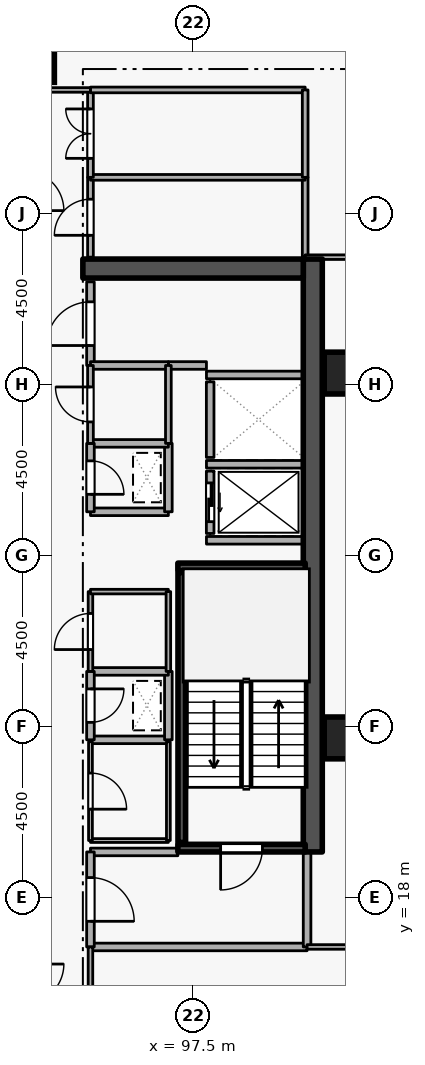
"""IFC4 building model, lengths in metres.
Left out: names, types, materials, properties, quantities, classifications, styles, units other than length and angle.
Written with IfcOpenShell. Run it as: python <this file> out.ifc"""

import sys

from ifc_helpers import new_model, si_unit, direction, frame, frame_2d, origin, origin_2d, place, context, subcontext, project, spatial, rectangle, extrude, element, fill, save


model = new_model("IFC4")
c1 = context("Model", 3, precision=1e-05, world=origin(), true_north=direction((0.0, 1.0)))
c2 = subcontext(c1, "Body", "Model", "MODEL_VIEW")
j1 = project(units=[si_unit("LENGTHUNIT", "METRE"), si_unit("PLANEANGLEUNIT", "RADIAN")], contexts=[c1])
p1 = place(None, origin())
s1 = spatial("IfcSite", under=j1, at=p1, CompositionType="ELEMENT")
p2 = place(p1, origin())
s2 = spatial("IfcBuilding", under=s1, at=p2, CompositionType="ELEMENT")
p3 = place(p2, frame((0.0, 0.0, 159.9)))
s3 = spatial("IfcBuildingStorey", under=s2, at=p3, CompositionType="ELEMENT", Elevation=159.9)
p4 = place(p3, frame((100.65, 19.2, 0.0), z_axis=(0.0, 0.0, 1.0), x_axis=(0.0, 1.0, 0.0)))
e1 = element("IfcWall", 1, at=p4, inside=s3, PredefinedType="SHEAR", context=c2, shape_type="SweptSolid", body=[
    extrude(rectangle(XDim=15.6, YDim=0.5, at=frame_2d((7.8, 0.0))), origin(), (0.0, 0.0, 1.0), 3.6),
])
p5 = place(p3, frame((94.6, 34.55, 0.0), z_axis=(0.0, 0.0, 1.0), x_axis=(1.0, 0.0, 0.0)))
e2 = element("IfcWall", 2, at=p5, inside=s3, PredefinedType="SHEAR", context=c2, shape_type="SweptSolid", body=[
    extrude(rectangle(XDim=5.8, YDim=0.5, at=frame_2d((2.9, 0.0))), origin(), (0.0, 0.0, 1.0), 3.6),
])
for number, where, z_axis, x_axis in (
    (3, (93.3, 40.0, 0.0), (0.0, 0.0, 1.0), (1.0, 0.0, 0.0)),
    (4, (101.5, 22.2, 0.0), (0.0, 0.0, 1.0), (1.0, 0.0, 0.0)),
    (5, (101.5, 31.8, 0.0), (0.0, 0.0, 1.0), (1.0, 0.0, 0.0)),
):
    element("IfcColumn", number, at=place(p3, frame(where, z_axis=z_axis, x_axis=x_axis)), inside=s3, PredefinedType="COLUMN", context=c2, shape_type="SweptSolid", body=[
        extrude(rectangle(XDim=1.1, YDim=1.1, at=origin_2d()), origin(), (0.0, 0.0, 1.0), 3.6),
    ])
p6 = place(p3, frame((97.95, 29.22, 0.0), z_axis=(0.0, 0.0, 1.0), x_axis=(0.0, -1.0, 0.0)))
e6 = element("IfcWall", 6, at=p6, inside=s3, PredefinedType="STANDARD", context=c2, shape_type="SweptSolid", body=[
    extrude(rectangle(XDim=1.64, YDim=0.2, at=frame_2d((0.82, 0.0))), origin(), (0.0, 0.0, 1.0), 3.34),
])
p7 = place(p6, frame((0.31, 0.0, 0.0)))
e7 = element("IfcOpeningElement", 7, at=p7, cuts=e6, PredefinedType="OPENING", context=c2, shape_type="SweptSolid", body=[
    extrude(rectangle(XDim=1.02, YDim=2.06, at=frame_2d((0.51, 1.03))), frame((0.0, 0.11, 0.0), z_axis=(0.0, -1.0, 0.0), x_axis=(1.0, 0.0, 0.0)), (0.0, 0.0, 1.0), 0.22),
])
p8 = place(p3, frame((97.95, 31.57, 0.0), z_axis=(0.0, 0.0, 1.0), x_axis=(0.0, -1.0, 0.0)))
e8 = element("IfcWall", 8, at=p8, inside=s3, PredefinedType="STANDARD", context=c2, shape_type="SweptSolid", body=[
    extrude(rectangle(XDim=1.99, YDim=0.2, at=frame_2d((0.995, 0.0))), origin(), (0.0, 0.0, 1.0), 3.34),
])
for number, where, z_axis, x_axis in (
    (9, (97.852, 29.4, 0.0), (0.0, 0.0, 1.0), (1.0, 0.0, 0.0)),
    (10, (97.852, 27.4, 0.0), (0.0, 0.0, 1.0), (1.0, 0.0, 0.0)),
    (11, (97.852, 31.75, 0.0), (0.0, 0.0, 1.0), (1.0, 0.0, 0.0)),
):
    element("IfcWall", number, at=place(p3, frame(where, z_axis=z_axis, x_axis=x_axis)), inside=s3, PredefinedType="STANDARD", context=c2, shape_type="SweptSolid", body=[
        extrude(rectangle(XDim=2.536, YDim=0.2, at=frame_2d((1.268, 0.0))), origin(), (0.0, 0.0, 1.0), 3.34),
    ])
p9 = place(p3, frame((100.45, 19.3, 0.0), z_axis=(0.0, 0.0, 1.0), x_axis=(-1.0, 0.0, 0.0)))
e12 = element("IfcWall", 12, at=p9, inside=s3, PredefinedType="SHEAR", context=c2, shape_type="SweptSolid", body=[
    extrude(rectangle(XDim=3.35, YDim=0.2, at=frame_2d((1.675, 0.0))), origin(), (0.0, 0.0, 1.0), 3.6),
])
p10 = place(p9, frame((1.125, 0.0, 0.0)))
e13 = element("IfcOpeningElement", 13, at=p10, cuts=e12, PredefinedType="OPENING", context=c2, shape_type="SweptSolid", body=[
    extrude(rectangle(XDim=1.1, YDim=2.1, at=frame_2d((0.55, 1.05))), frame((0.0, 0.11, 0.0), z_axis=(0.0, -1.0, 0.0), x_axis=(1.0, 0.0, 0.0)), (0.0, 0.0, 1.0), 0.22),
])
p11 = place(p3, frame((97.1, 26.7, 0.0), z_axis=(0.0, 0.0, 1.0), x_axis=(1.0, 0.0, 0.0)))
e14 = element("IfcWall", 14, at=p11, inside=s3, PredefinedType="SHEAR", context=c2, shape_type="SweptSolid", body=[
    extrude(rectangle(XDim=3.35, YDim=0.2, at=frame_2d((1.675, 0.0))), origin(), (0.0, 0.0, 1.0), 3.6),
])
p12 = place(p3, frame((97.203, 26.55, 0.0), z_axis=(0.0, 0.0, 1.0), x_axis=(0.0, -1.0, 0.0)))
e15 = element("IfcWall", 15, at=p12, inside=s3, PredefinedType="SHEAR", context=c2, shape_type="SweptSolid", body=[
    extrude(rectangle(XDim=7.1, YDim=0.2, at=frame_2d((3.55, 0.0))), origin(), (0.0, 0.0, 1.0), 3.6),
])
p13 = place(p3, frame((94.8, 16.7, 0.0), z_axis=(0.0, 0.0, 1.0), x_axis=(1.0, 0.0, 0.0)))
e16 = element("IfcWall", 16, at=p13, inside=s3, PredefinedType="STANDARD", context=c2, shape_type="SweptSolid", body=[
    extrude(rectangle(XDim=5.7, YDim=0.2, at=frame_2d((2.85, 0.0))), origin(), (0.0, 0.0, 1.0), 3.34),
])
p14 = place(p3, frame((100.5, 16.7, 0.0), z_axis=(0.0, 0.0, 1.0), x_axis=(0.0, 1.0, 0.0)))
e17 = element("IfcWall", 17, at=p14, inside=s3, PredefinedType="STANDARD", context=c2, shape_type="SweptSolid", body=[
    extrude(rectangle(XDim=2.5, YDim=0.2, at=frame_2d((1.25, 0.0))), origin(), (0.0, 0.0, 1.0), 3.34),
])
p15 = place(p3, frame((97.1, 19.2, 0.0), z_axis=(0.0, 0.0, 1.0), x_axis=(-1.0, 0.0, 0.0)))
e18 = element("IfcWall", 18, at=p15, inside=s3, PredefinedType="STANDARD", context=c2, shape_type="SweptSolid", body=[
    extrude(rectangle(XDim=2.3, YDim=0.2, at=frame_2d((1.15, 0.0))), origin(), (0.0, 0.0, 1.0), 2.545),
])
p16 = place(p3, frame((94.8, 19.2, 0.0), z_axis=(0.0, 0.0, 1.0), x_axis=(0.0, -1.0, 0.0)))
e19 = element("IfcWall", 19, at=p16, inside=s3, PredefinedType="STANDARD", context=c2, shape_type="SweptSolid", body=[
    extrude(rectangle(XDim=2.5, YDim=0.2, at=frame_2d((1.25, 0.0))), origin(), (0.0, 0.0, 1.0), 3.34),
])
p17 = place(p16, frame((0.675, 0.0, 0.0)))
e20 = element("IfcOpeningElement", 20, at=p17, cuts=e19, PredefinedType="OPENING", context=c2, shape_type="SweptSolid", body=[
    extrude(rectangle(XDim=1.15, YDim=2.1, at=frame_2d((0.575, 1.05))), frame((0.0, 0.11, 0.0), z_axis=(0.0, -1.0, 0.0), x_axis=(1.0, 0.0, 0.0)), (0.0, 0.0, 1.0), 0.22),
])
p18 = place(p3, frame((94.8, 28.15, 0.0), z_axis=(0.0, 0.0, 1.0), x_axis=(1.0, 0.0, 0.0)))
e21 = element("IfcWall", 21, at=p18, inside=s3, PredefinedType="STANDARD", context=c2, shape_type="SweptSolid", body=[
    extrude(rectangle(XDim=2.05, YDim=0.2, at=frame_2d((1.025, 0.0))), origin(), (0.0, 0.0, 1.0), 3.34),
])
p19 = place(p3, frame((96.85, 28.15, 0.0), z_axis=(0.0, 0.0, 1.0), x_axis=(0.0, 1.0, 0.0)))
e22 = element("IfcWall", 22, at=p19, inside=s3, PredefinedType="STANDARD", context=c2, shape_type="SweptSolid", body=[
    extrude(rectangle(XDim=1.8, YDim=0.2, at=frame_2d((0.9, 0.0))), origin(), (0.0, 0.0, 1.0), 3.34),
])
p20 = place(p3, frame((96.85, 29.95, 0.0), z_axis=(0.0, 0.0, 1.0), x_axis=(-1.0, 0.0, 0.0)))
e23 = element("IfcWall", 23, at=p20, inside=s3, PredefinedType="STANDARD", context=c2, shape_type="SweptSolid", body=[
    extrude(rectangle(XDim=2.05, YDim=0.2, at=frame_2d((1.025, 0.0))), origin(), (0.0, 0.0, 1.0), 3.34),
])
p21 = place(p3, frame((94.8, 29.95, 0.0), z_axis=(0.0, 0.0, 1.0), x_axis=(0.0, -1.0, 0.0)))
e24 = element("IfcWall", 24, at=p21, inside=s3, PredefinedType="STANDARD", context=c2, shape_type="SweptSolid", body=[
    extrude(rectangle(XDim=1.8, YDim=0.2, at=frame_2d((0.9, 0.0))), origin(), (0.0, 0.0, 1.0), 3.34),
])
p22 = place(p21, frame((0.46, 0.0, 0.0)))
e25 = element("IfcOpeningElement", 25, at=p22, cuts=e24, PredefinedType="OPENING", context=c2, shape_type="SweptSolid", body=[
    extrude(rectangle(XDim=0.88, YDim=2.04, at=frame_2d((0.44, 1.02))), frame((0.0, 0.11, 0.0), z_axis=(0.0, -1.0, 0.0), x_axis=(1.0, 0.0, 0.0)), (0.0, 0.0, 1.0), 0.22),
])
p23 = place(p3, frame((94.8, 22.15, 0.0), z_axis=(0.0, 0.0, 1.0), x_axis=(1.0, 0.0, 0.0)))
e26 = element("IfcWall", 26, at=p23, inside=s3, PredefinedType="STANDARD", context=c2, shape_type="SweptSolid", body=[
    extrude(rectangle(XDim=2.05, YDim=0.2, at=frame_2d((1.025, 0.0))), origin(), (0.0, 0.0, 1.0), 3.34),
])
p24 = place(p3, frame((96.85, 22.15, 0.0), z_axis=(0.0, 0.0, 1.0), x_axis=(0.0, 1.0, 0.0)))
e27 = element("IfcWall", 27, at=p24, inside=s3, PredefinedType="STANDARD", context=c2, shape_type="SweptSolid", body=[
    extrude(rectangle(XDim=1.8, YDim=0.2, at=frame_2d((0.9, 0.0))), origin(), (0.0, 0.0, 1.0), 3.34),
])
p25 = place(p3, frame((96.85, 23.95, 0.0), z_axis=(0.0, 0.0, 1.0), x_axis=(-1.0, 0.0, 0.0)))
e28 = element("IfcWall", 28, at=p25, inside=s3, PredefinedType="STANDARD", context=c2, shape_type="SweptSolid", body=[
    extrude(rectangle(XDim=2.05, YDim=0.2, at=frame_2d((1.025, 0.0))), origin(), (0.0, 0.0, 1.0), 3.34),
])
p26 = place(p3, frame((94.8, 23.95, 0.0), z_axis=(0.0, 0.0, 1.0), x_axis=(0.0, -1.0, 0.0)))
e29 = element("IfcWall", 29, at=p26, inside=s3, PredefinedType="STANDARD", context=c2, shape_type="SweptSolid", body=[
    extrude(rectangle(XDim=1.8, YDim=0.2, at=frame_2d((0.9, 0.0))), origin(), (0.0, 0.0, 1.0), 3.34),
])
p27 = place(p26, frame((0.46, 0.0, 0.0)))
e30 = element("IfcOpeningElement", 30, at=p27, cuts=e29, PredefinedType="OPENING", context=c2, shape_type="SweptSolid", body=[
    extrude(rectangle(XDim=0.88, YDim=2.04, at=frame_2d((0.44, 1.02))), frame((0.0, 0.11, 0.0), z_axis=(0.0, -1.0, 0.0), x_axis=(1.0, 0.0, 0.0)), (0.0, 0.0, 1.0), 0.22),
])
p28 = place(p3, frame((94.8, 32.0, 0.0), z_axis=(0.0, 0.0, 1.0), x_axis=(0.0, 1.0, 0.0)))
e31 = element("IfcWall", 31, at=p28, inside=s3, PredefinedType="STANDARD", context=c2, shape_type="SweptSolid", body=[
    extrude(rectangle(XDim=2.2, YDim=0.2, at=frame_2d((1.1, 0.0))), origin(), (0.0, 0.0, 1.0), 3.34),
])
p29 = place(p28, frame((0.525, 0.0, 0.0)))
e32 = element("IfcOpeningElement", 32, at=p29, cuts=e31, PredefinedType="OPENING", context=c2, shape_type="SweptSolid", body=[
    extrude(rectangle(XDim=1.15, YDim=2.1, at=frame_2d((0.575, 1.05))), frame((0.0, 0.11, 0.0), z_axis=(0.0, -1.0, 0.0), x_axis=(1.0, 0.0, 0.0)), (0.0, 0.0, 1.0), 0.22),
])
p30 = place(p3, frame((97.852, 32.0, 0.0), z_axis=(0.0, 0.0, 1.0), x_axis=(-1.0, 0.0, 0.0)))
e33 = element("IfcWall", 33, at=p30, inside=s3, PredefinedType="STANDARD", context=c2, shape_type="SweptSolid", body=[
    extrude(rectangle(XDim=1.002, YDim=0.2, at=frame_2d((0.501, 0.0))), origin(), (0.0, 0.0, 1.0), 3.34),
])
p31 = place(p3, frame((96.85, 32.0, 0.0), z_axis=(0.0, 0.0, 1.0), x_axis=(-1.0, 0.0, 0.0)))
e34 = element("IfcWall", 34, at=p31, inside=s3, PredefinedType="STANDARD", context=c2, shape_type="SweptSolid", body=[
    extrude(rectangle(XDim=2.05, YDim=0.2, at=frame_2d((1.025, 0.0))), origin(), (0.0, 0.0, 1.0), 3.34),
])
p32 = place(p3, frame((94.8, 19.5, 0.0), z_axis=(0.0, 0.0, 1.0), x_axis=(1.0, 0.0, 0.0)))
e35 = element("IfcWall", 35, at=p32, inside=s3, PredefinedType="PARTITIONING", context=c2, shape_type="SweptSolid", body=[
    extrude(rectangle(XDim=2.05, YDim=0.1, at=frame_2d((1.025, 0.0))), origin(), (0.0, 0.0, 1.0), 2.545),
])
p33 = place(p3, frame((96.85, 19.5, 0.0), z_axis=(0.0, 0.0, 1.0), x_axis=(0.0, 1.0, 0.0)))
e36 = element("IfcWall", 36, at=p33, inside=s3, PredefinedType="PARTITIONING", context=c2, shape_type="SweptSolid", body=[
    extrude(rectangle(XDim=2.6, YDim=0.1, at=frame_2d((1.3, 0.0))), origin(), (0.0, 0.0, 1.0), 3.34),
])
p34 = place(p3, frame((94.8, 22.1, 0.0), z_axis=(0.0, 0.0, 1.0), x_axis=(0.0, -1.0, 0.0)))
e37 = element("IfcWall", 37, at=p34, inside=s3, PredefinedType="PARTITIONING", context=c2, shape_type="SweptSolid", body=[
    extrude(rectangle(XDim=2.6, YDim=0.1, at=frame_2d((1.3, 0.0))), origin(), (0.0, 0.0, 1.0), 3.34),
])
p35 = place(p34, frame((0.825, 0.0, 0.0)))
e38 = element("IfcOpeningElement", 38, at=p35, cuts=e37, PredefinedType="OPENING", context=c2, shape_type="SweptSolid", body=[
    extrude(rectangle(XDim=0.95, YDim=2.1, at=frame_2d((0.475, 1.05))), frame((0.0, 0.06, 0.0), z_axis=(0.0, -1.0, 0.0), x_axis=(1.0, 0.0, 0.0)), (0.0, 0.0, 1.0), 0.12),
])
p36 = place(p3, frame((94.8, 23.95, 0.0), z_axis=(0.0, 0.0, 1.0), x_axis=(0.0, 1.0, 0.0)))
e39 = element("IfcWall", 39, at=p36, inside=s3, PredefinedType="PARTITIONING", context=c2, shape_type="SweptSolid", body=[
    extrude(rectangle(XDim=2.1, YDim=0.12, at=frame_2d((1.05, 0.0))), origin(), (0.0, 0.0, 1.0), 3.34),
])
p37 = place(p36, frame((0.575, 0.0, 0.0)))
e40 = element("IfcOpeningElement", 40, at=p37, cuts=e39, PredefinedType="OPENING", context=c2, shape_type="SweptSolid", body=[
    extrude(rectangle(XDim=0.95, YDim=2.1, at=frame_2d((0.475, 1.05))), frame((0.0, 0.07, 0.0), z_axis=(0.0, -1.0, 0.0), x_axis=(1.0, 0.0, 0.0)), (0.0, 0.0, 1.0), 0.14),
])
p38 = place(p3, frame((94.8, 26.05, 0.0), z_axis=(0.0, 0.0, 1.0), x_axis=(1.0, 0.0, 0.0)))
e41 = element("IfcWall", 41, at=p38, inside=s3, PredefinedType="PARTITIONING", context=c2, shape_type="SweptSolid", body=[
    extrude(rectangle(XDim=2.05, YDim=0.12, at=frame_2d((1.025, 0.0))), origin(), (0.0, 0.0, 1.0), 3.34),
])
p39 = place(p3, frame((96.85, 26.05, 0.0), z_axis=(0.0, 0.0, 1.0), x_axis=(0.0, -1.0, 0.0)))
e42 = element("IfcWall", 42, at=p39, inside=s3, PredefinedType="PARTITIONING", context=c2, shape_type="SweptSolid", body=[
    extrude(rectangle(XDim=2.1, YDim=0.12, at=frame_2d((1.05, 0.0))), origin(), (0.0, 0.0, 1.0), 3.34),
])
p40 = place(p3, frame((94.8, 29.95, 0.0), z_axis=(0.0, 0.0, 1.0), x_axis=(0.0, 1.0, 0.0)))
e43 = element("IfcWall", 43, at=p40, inside=s3, PredefinedType="PARTITIONING", context=c2, shape_type="SweptSolid", body=[
    extrude(rectangle(XDim=2.05, YDim=0.15, at=frame_2d((1.025, 0.0))), origin(), (0.0, 0.0, 1.0), 3.34),
])
p41 = place(p40, frame((0.565, 0.0, 0.0)))
e44 = element("IfcOpeningElement", 44, at=p41, cuts=e43, PredefinedType="OPENING", context=c2, shape_type="SweptSolid", body=[
    extrude(rectangle(XDim=0.92, YDim=2.08, at=frame_2d((0.46, 1.04))), frame((0.0, 0.085, 0.0), z_axis=(0.0, -1.0, 0.0), x_axis=(1.0, 0.0, 0.0)), (0.0, 0.0, 1.0), 0.17),
])
p42 = place(p3, frame((96.85, 32.0, 0.0), z_axis=(0.0, 0.0, 1.0), x_axis=(0.0, -1.0, 0.0)))
e45 = element("IfcWall", 45, at=p42, inside=s3, PredefinedType="PARTITIONING", context=c2, shape_type="SweptSolid", body=[
    extrude(rectangle(XDim=2.05, YDim=0.15, at=frame_2d((1.025, 0.0))), origin(), (0.0, 0.0, 1.0), 3.34),
])
p43 = place(p3, frame((100.45, 36.95, 0.0), z_axis=(0.0, 0.0, 1.0), x_axis=(0.0, -1.0, 0.0)))
e46 = element("IfcWall", 46, at=p43, inside=s3, PredefinedType="PARTITIONING", context=c2, shape_type="SweptSolid", body=[
    extrude(rectangle(XDim=2.1, YDim=0.15, at=frame_2d((1.05, 0.0))), origin(), (0.0, 0.0, 1.0), 3.34),
])
p44 = place(p3, frame((94.8, 34.85, 0.0), z_axis=(0.0, 0.0, 1.0), x_axis=(0.0, 1.0, 0.0)))
e47 = element("IfcWall", 47, at=p44, inside=s3, PredefinedType="PARTITIONING", context=c2, shape_type="SweptSolid", body=[
    extrude(rectangle(XDim=2.1, YDim=0.15, at=frame_2d((1.05, 0.0))), origin(), (0.0, 0.0, 1.0), 3.34),
])
p45 = place(p44, frame((0.575, 0.0, 0.0)))
e48 = element("IfcOpeningElement", 48, at=p45, cuts=e47, PredefinedType="OPENING", context=c2, shape_type="SweptSolid", body=[
    extrude(rectangle(XDim=0.95, YDim=2.1, at=frame_2d((0.475, 1.05))), frame((0.0, 0.085, 0.0), z_axis=(0.0, -1.0, 0.0), x_axis=(1.0, 0.0, 0.0)), (0.0, 0.0, 1.0), 0.17),
])
p46 = place(p3, frame((94.8, 36.95, 0.0), z_axis=(0.0, 0.0, 1.0), x_axis=(1.0, 0.0, 0.0)))
e49 = element("IfcWall", 49, at=p46, inside=s3, PredefinedType="PARTITIONING", context=c2, shape_type="SweptSolid", body=[
    extrude(rectangle(XDim=5.65, YDim=0.15, at=frame_2d((2.825, 0.0))), origin(), (0.0, 0.0, 1.0), 3.34),
])
p47 = place(p3, frame((94.8, 36.95, 0.0), z_axis=(0.0, 0.0, 1.0), x_axis=(0.0, 1.0, 0.0)))
e50 = element("IfcWall", 50, at=p47, inside=s3, PredefinedType="PARTITIONING", context=c2, shape_type="SweptSolid", body=[
    extrude(rectangle(XDim=2.3, YDim=0.15, at=frame_2d((1.15, 0.0))), origin(), (0.0, 0.0, 1.0), 3.34),
])
p48 = place(p47, frame((0.5, 0.0, 0.0)))
e51 = element("IfcOpeningElement", 51, at=p48, cuts=e50, PredefinedType="OPENING", context=c2, shape_type="SweptSolid", body=[
    extrude(rectangle(XDim=1.3, YDim=2.12, at=frame_2d((0.65, 1.06))), frame((0.0, 0.085, 0.0), z_axis=(0.0, -1.0, 0.0), x_axis=(1.0, 0.0, 0.0)), (0.0, 0.0, 1.0), 0.17),
])
p49 = place(p3, frame((94.8, 39.25, 0.0), z_axis=(0.0, 0.0, 1.0), x_axis=(1.0, 0.0, 0.0)))
e52 = element("IfcWall", 52, at=p49, inside=s3, PredefinedType="PARTITIONING", context=c2, shape_type="SweptSolid", body=[
    extrude(rectangle(XDim=5.65, YDim=0.15, at=frame_2d((2.825, 0.0))), origin(), (0.0, 0.0, 1.0), 3.34),
])
p50 = place(p3, frame((100.45, 39.25, 0.0), z_axis=(0.0, 0.0, 1.0), x_axis=(0.0, -1.0, 0.0)))
e53 = element("IfcWall", 53, at=p50, inside=s3, PredefinedType="PARTITIONING", context=c2, shape_type="SweptSolid", body=[
    extrude(rectangle(XDim=2.3, YDim=0.15, at=frame_2d((1.15, 0.0))), origin(), (0.0, 0.0, 1.0), 3.34),
])
p51 = place(p3, frame((94.8, 14.75, 0.0), z_axis=(0.0, 0.0, 1.0), x_axis=(0.0, 1.0, 0.0)))
e54 = element("IfcWall", 54, at=p51, inside=s3, PredefinedType="PARTITIONING", context=c2, shape_type="SweptSolid", body=[
    extrude(rectangle(XDim=1.95, YDim=0.12, at=frame_2d((0.975, 0.0))), origin(), (0.0, 0.0, 1.0), 3.34),
])
p52 = place(p3, frame((100.5, 16.7, 0.0), z_axis=(0.0, 0.0, 1.0), x_axis=(1.0, 0.0, 0.0)))
e55 = element("IfcWall", 55, at=p52, inside=s3, PredefinedType="PARTITIONING", context=c2, shape_type="SweptSolid", body=[
    extrude(rectangle(XDim=11.72, YDim=0.12, at=frame_2d((5.86, 0.0))), origin(), (0.0, 0.0, 1.0), 3.34),
])
p53 = place(p3, frame((94.8, 39.25, 0.0), z_axis=(0.0, 0.0, 1.0), x_axis=(-1.0, 0.0, 0.0)))
e56 = element("IfcWall", 56, at=p53, inside=s3, PredefinedType="PARTITIONING", context=c2, shape_type="SweptSolid", body=[
    extrude(rectangle(XDim=1.75, YDim=0.12, at=frame_2d((0.875, 0.0))), origin(), (0.0, 0.0, 1.0), 3.34),
])
p54 = place(p3, frame((112.22, 34.85, 0.0), z_axis=(0.0, 0.0, 1.0), x_axis=(-1.0, 0.0, 0.0)))
e57 = element("IfcWall", 57, at=p54, inside=s3, PredefinedType="PARTITIONING", context=c2, shape_type="SweptSolid", body=[
    extrude(rectangle(XDim=11.77, YDim=0.12, at=frame_2d((5.885, 0.0))), origin(), (0.0, 0.0, 1.0), 2.545),
])
p55 = place(p7, origin())
e58 = element("IfcDoor", 58, at=p55, inside=s3, OperationType="SLIDING_TO_LEFT", PredefinedType="DOOR", context=c2, shape_type="SweptSolid", body=[
    extrude(rectangle(XDim=1.02, YDim=2.06, at=frame_2d((0.51, 1.03))), frame((0.0, 0.025, 0.0), z_axis=(0.0, -1.0, 0.0), x_axis=(1.0, 0.0, 0.0)), (0.0, 0.0, 1.0), 0.05),
])
fill(e7, e58)
p56 = place(p10, origin())
e59 = element("IfcDoor", 59, at=p56, inside=s3, OperationType="SINGLE_SWING_RIGHT", PredefinedType="DOOR", context=c2, shape_type="SweptSolid", body=[
    extrude(rectangle(XDim=1.1, YDim=2.1, at=frame_2d((0.55, 1.05))), frame((0.0, 0.025, 0.0), z_axis=(0.0, -1.0, 0.0), x_axis=(1.0, 0.0, 0.0)), (0.0, 0.0, 1.0), 0.05),
])
fill(e13, e59)
p57 = place(p17, origin())
e60 = element("IfcDoor", 60, at=p57, inside=s3, OperationType="SINGLE_SWING_RIGHT", PredefinedType="DOOR", context=c2, shape_type="SweptSolid", body=[
    extrude(rectangle(XDim=1.15, YDim=2.1, at=frame_2d((0.575, 1.05))), frame((0.0, 0.025, 0.0), z_axis=(0.0, -1.0, 0.0), x_axis=(1.0, 0.0, 0.0)), (0.0, 0.0, 1.0), 0.05),
])
fill(e20, e60)
p58 = place(p22, origin())
e61 = element("IfcDoor", 61, at=p58, inside=s3, OperationType="SINGLE_SWING_RIGHT", PredefinedType="DOOR", context=c2, shape_type="SweptSolid", body=[
    extrude(rectangle(XDim=0.88, YDim=2.04, at=frame_2d((0.44, 1.02))), frame((0.0, 0.025, 0.0), z_axis=(0.0, -1.0, 0.0), x_axis=(1.0, 0.0, 0.0)), (0.0, 0.0, 1.0), 0.05),
])
fill(e25, e61)
p59 = place(p27, origin())
e62 = element("IfcDoor", 62, at=p59, inside=s3, OperationType="SINGLE_SWING_LEFT", PredefinedType="DOOR", context=c2, shape_type="SweptSolid", body=[
    extrude(rectangle(XDim=0.88, YDim=2.04, at=frame_2d((0.44, 1.02))), frame((0.0, 0.025, 0.0), z_axis=(0.0, -1.0, 0.0), x_axis=(1.0, 0.0, 0.0)), (0.0, 0.0, 1.0), 0.05),
])
fill(e30, e62)
p60 = place(p35, origin())
e63 = element("IfcDoor", 63, at=p60, inside=s3, OperationType="SINGLE_SWING_RIGHT", PredefinedType="DOOR", context=c2, shape_type="SweptSolid", body=[
    extrude(rectangle(XDim=0.95, YDim=2.1, at=frame_2d((0.475, 1.05))), frame((0.0, 0.025, 0.0), z_axis=(0.0, -1.0, 0.0), x_axis=(1.0, 0.0, 0.0)), (0.0, 0.0, 1.0), 0.05),
])
fill(e38, e63)
p61 = place(p37, origin())
e64 = element("IfcDoor", 64, at=p61, inside=s3, OperationType="SINGLE_SWING_LEFT", PredefinedType="DOOR", context=c2, shape_type="SweptSolid", body=[
    extrude(rectangle(XDim=0.95, YDim=2.1, at=frame_2d((0.475, 1.05))), frame((0.0, 0.025, 0.0), z_axis=(0.0, -1.0, 0.0), x_axis=(1.0, 0.0, 0.0)), (0.0, 0.0, 1.0), 0.05),
])
fill(e40, e64)
p62 = place(p41, origin())
e65 = element("IfcDoor", 65, at=p62, inside=s3, OperationType="SINGLE_SWING_RIGHT", PredefinedType="DOOR", context=c2, shape_type="SweptSolid", body=[
    extrude(rectangle(XDim=0.92, YDim=2.08, at=frame_2d((0.46, 1.04))), frame((0.0, 0.025, 0.0), z_axis=(0.0, -1.0, 0.0), x_axis=(1.0, 0.0, 0.0)), (0.0, 0.0, 1.0), 0.05),
])
fill(e44, e65)
p63 = place(p29, origin())
e66 = element("IfcDoor", 66, at=p63, inside=s3, OperationType="SINGLE_SWING_LEFT", PredefinedType="DOOR", context=c2, shape_type="SweptSolid", body=[
    extrude(rectangle(XDim=1.15, YDim=2.1, at=frame_2d((0.575, 1.05))), frame((0.0, 0.025, 0.0), z_axis=(0.0, -1.0, 0.0), x_axis=(1.0, 0.0, 0.0)), (0.0, 0.0, 1.0), 0.05),
])
fill(e32, e66)
p64 = place(p45, origin())
e67 = element("IfcDoor", 67, at=p64, inside=s3, OperationType="SINGLE_SWING_LEFT", PredefinedType="DOOR", context=c2, shape_type="SweptSolid", body=[
    extrude(rectangle(XDim=0.95, YDim=2.1, at=frame_2d((0.475, 1.05))), frame((0.0, 0.025, 0.0), z_axis=(0.0, -1.0, 0.0), x_axis=(1.0, 0.0, 0.0)), (0.0, 0.0, 1.0), 0.05),
])
fill(e48, e67)
p65 = place(p48, origin())
e68 = element("IfcDoor", 68, at=p65, inside=s3, OperationType="DOUBLE_DOOR_SINGLE_SWING", PredefinedType="DOOR", context=c2, shape_type="SweptSolid", body=[
    extrude(rectangle(XDim=1.3, YDim=2.12, at=frame_2d((0.65, 1.06))), frame((0.0, 0.025, 0.0), z_axis=(0.0, -1.0, 0.0), x_axis=(1.0, 0.0, 0.0)), (0.0, 0.0, 1.0), 0.05),
])
fill(e51, e68)
save(model, sys.argv[1])
